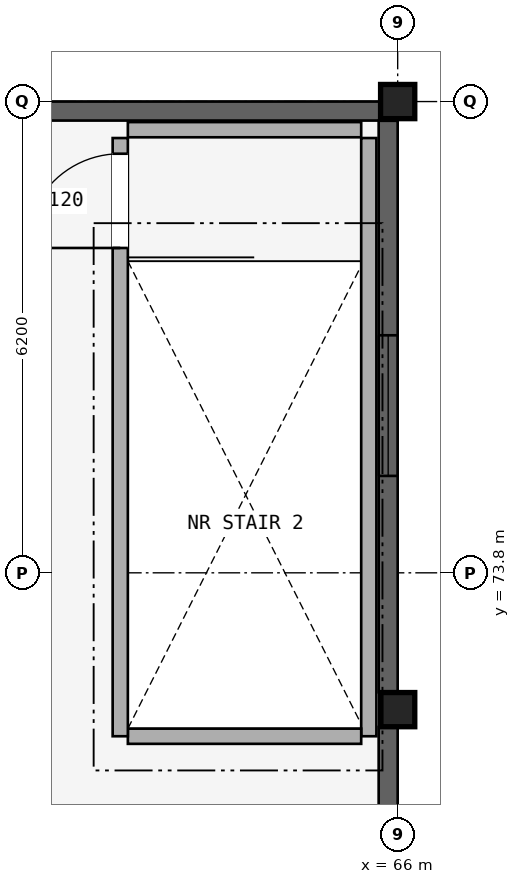
"""IFC4 building model, lengths in metres.
Left out: names, types, materials, properties, quantities, classifications, styles, units other than length and angle.
Written with IfcOpenShell. Run it as: python <this file> out.ifc"""

import sys

from ifc_helpers import new_model, si_unit, direction, frame, frame_2d, origin, origin_2d, place, context, subcontext, project, spatial, rectangle, extrude, element, fill, save


model = new_model("IFC4")
c1 = context("Model", 3, precision=1e-05, world=origin(), true_north=direction((0.0, 1.0)))
c2 = subcontext(c1, "Body", "Model", "MODEL_VIEW")
j1 = project(units=[si_unit("LENGTHUNIT", "METRE"), si_unit("PLANEANGLEUNIT", "RADIAN")], contexts=[c1])
p1 = place(None, origin())
s1 = spatial("IfcSite", under=j1, at=p1, CompositionType="ELEMENT")
p2 = place(p1, origin())
s2 = spatial("IfcBuilding", under=s1, at=p2, CompositionType="ELEMENT")
p3 = place(p2, frame((0.0, 0.0, 4.5)))
s3 = spatial("IfcBuildingStorey", under=s2, at=p3, CompositionType="ELEMENT", Elevation=4.5)
p4 = place(p3, frame((66.0, 72.0, 0.0), z_axis=(0.0, 0.0, 1.0), x_axis=(1.0, 0.0, 0.0)))
e1 = element("IfcColumn", 1, at=p4, inside=s3, PredefinedType="COLUMN", context=c2, shape_type="SweptSolid", body=[
    extrude(rectangle(XDim=0.45, YDim=0.45, at=origin_2d()), origin(), (0.0, 0.0, 1.0), 4.0),
])
p5 = place(p3, frame((66.0, 80.0, 0.0), z_axis=(0.0, 0.0, 1.0), x_axis=(1.0, 0.0, 0.0)))
e2 = element("IfcColumn", 2, at=p5, inside=s3, PredefinedType="COLUMN", context=c2, shape_type="SweptSolid", body=[
    extrude(rectangle(XDim=0.45, YDim=0.45, at=origin_2d()), origin(), (0.0, 0.0, 1.0), 4.85),
])
p6 = place(p3, frame((65.62, 71.65, 0.0), z_axis=(0.0, 0.0, 1.0), x_axis=(0.0, 1.0, 0.0)))
e3 = element("IfcWall", 3, at=p6, inside=s3, PredefinedType="STANDARD", context=c2, shape_type="SweptSolid", body=[
    extrude(rectangle(XDim=7.87, YDim=0.2, at=frame_2d((3.935, 0.0))), origin(), (0.0, 0.0, 1.0), 2.792),
])
for number, where, z_axis, x_axis in (
    (4, (62.45, 79.63, 0.0), (0.0, 0.0, 1.0), (1.0, 0.0, 0.0)),
    (5, (62.45, 71.65, 0.0), (0.0, 0.0, 1.0), (1.0, 0.0, 0.0)),
):
    element("IfcWall", number, at=place(p3, frame(where, z_axis=z_axis, x_axis=x_axis)), inside=s3, PredefinedType="STANDARD", context=c2, shape_type="SweptSolid", body=[
        extrude(rectangle(XDim=3.07, YDim=0.2, at=frame_2d((1.535, 0.0))), origin(), (0.0, 0.0, 1.0), 3.95),
    ])
p7 = place(p3, frame((62.35, 71.65, 0.0), z_axis=(0.0, 0.0, 1.0), x_axis=(0.0, 1.0, 0.0)))
e6 = element("IfcWall", 6, at=p7, inside=s3, PredefinedType="STANDARD", context=c2, shape_type="SweptSolid", body=[
    extrude(rectangle(XDim=7.87, YDim=0.2, at=frame_2d((3.935, 0.0))), origin(), (0.0, 0.0, 1.0), 3.95),
])
p8 = place(p7, frame((6.424, 0.0, 0.0)))
e7 = element("IfcOpeningElement", 7, at=p8, cuts=e6, PredefinedType="OPENING", context=c2, shape_type="SweptSolid", body=[
    extrude(rectangle(XDim=1.24, YDim=2.15, at=frame_2d((0.62, 1.075))), frame((0.0, 0.11, 0.0), z_axis=(0.0, -1.0, 0.0), x_axis=(1.0, 0.0, 0.0)), (0.0, 0.0, 1.0), 0.22),
])
p9 = place(p3, frame((59.229, 79.875, 0.0), z_axis=(0.0, 0.0, 1.0), x_axis=(1.0, 0.0, 0.0)))
e8 = element("IfcWall", 8, at=p9, inside=s3, PredefinedType="STANDARD", context=c2, shape_type="SweptSolid", body=[
    extrude(rectangle(XDim=6.771, YDim=0.25, at=frame_2d((3.386, 0.0))), origin(), (0.0, 0.0, 1.0), 3.442),
])
p10 = place(p9, frame((0.671, 0.0, 0.88)))
e9 = element("IfcOpeningElement", 9, at=p10, cuts=e8, PredefinedType="OPENING", context=c2, shape_type="SweptSolid", body=[
    extrude(rectangle(XDim=1.2, YDim=1.5, at=frame_2d((0.6, 0.75))), frame((0.0, 0.135, 0.0), z_axis=(0.0, -1.0, 0.0), x_axis=(1.0, 0.0, 0.0)), (0.0, 0.0, 1.0), 0.27),
])
p11 = place(p3, frame((65.875, 64.229, 0.0), z_axis=(0.0, 0.0, 1.0), x_axis=(0.0, 1.0, 0.0)))
e10 = element("IfcWall", 10, at=p11, inside=s3, PredefinedType="STANDARD", context=c2, shape_type="SweptSolid", body=[
    extrude(rectangle(XDim=7.543, YDim=0.25, at=frame_2d((3.771, 0.0))), origin(), (0.0, 0.0, 1.0), 2.792),
])
p12 = place(p11, frame((2.846, 0.0, 0.692)))
e11 = element("IfcOpeningElement", 11, at=p12, cuts=e10, PredefinedType="OPENING", context=c2, shape_type="SweptSolid", body=[
    extrude(rectangle(XDim=1.85, YDim=1.9, at=frame_2d((0.925, 0.95))), frame((0.0, 0.135, 0.0), z_axis=(0.0, -1.0, 0.0), x_axis=(1.0, 0.0, 0.0)), (0.0, 0.0, 1.0), 0.27),
])
p13 = place(p3, frame((65.875, 72.229, 0.0), z_axis=(0.0, 0.0, 1.0), x_axis=(0.0, 1.0, 0.0)))
e12 = element("IfcWall", 12, at=p13, inside=s3, PredefinedType="STANDARD", context=c2, shape_type="SweptSolid", body=[
    extrude(rectangle(XDim=7.519, YDim=0.25, at=frame_2d((3.759, 0.0))), origin(), (0.0, 0.0, 1.0), 3.442),
])
p14 = place(p13, frame((2.846, 0.0, 0.88)))
e13 = element("IfcOpeningElement", 13, at=p14, cuts=e12, PredefinedType="OPENING", context=c2, shape_type="SweptSolid", body=[
    extrude(rectangle(XDim=1.85, YDim=1.9, at=frame_2d((0.925, 0.95))), frame((0.0, 0.135, 0.0), z_axis=(0.0, -1.0, 0.0), x_axis=(1.0, 0.0, 0.0)), (0.0, 0.0, 1.0), 0.27),
])
p15 = place(p14, origin())
e14 = element("IfcWindow", 14, at=p15, inside=s3, PartitioningType="DOUBLE_PANEL_VERTICAL", PredefinedType="WINDOW", context=c2, shape_type="SweptSolid", body=[
    extrude(rectangle(XDim=1.85, YDim=1.9, at=frame_2d((0.925, 0.95))), frame((0.0, 0.03, 0.0), z_axis=(0.0, -1.0, 0.0), x_axis=(1.0, 0.0, 0.0)), (0.0, 0.0, 1.0), 0.06),
])
fill(e13, e14)
p16 = place(p8, frame((1.24, 0.0, 0.0), z_axis=(0.0, 0.0, 1.0), x_axis=(-1.0, 0.0, 0.0)))
e15 = element("IfcDoor", 15, at=p16, inside=s3, OperationType="SINGLE_SWING_RIGHT", PredefinedType="DOOR", context=c2, shape_type="SweptSolid", body=[
    extrude(rectangle(XDim=1.24, YDim=2.15, at=frame_2d((0.62, 1.075))), frame((0.0, 0.025, 0.0), z_axis=(0.0, -1.0, 0.0), x_axis=(1.0, 0.0, 0.0)), (0.0, 0.0, 1.0), 0.05),
])
fill(e7, e15)
save(model, sys.argv[1])
